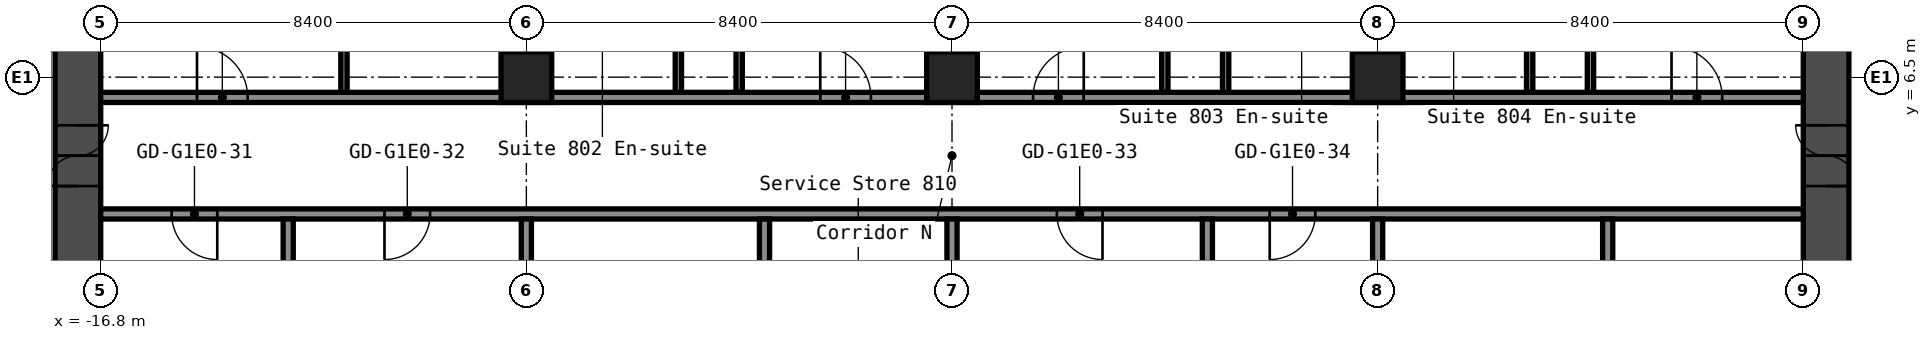
"""IFC4 building model, lengths in metres.
Left out: names, types, materials, properties, quantities, classifications, styles, units other than length and angle.
Written with IfcOpenShell. Run it as: python <this file> out.ifc"""

import sys

from ifc_helpers import new_model, si_unit, direction, frame, frame_2d, origin, origin_2d, place, context, subcontext, project, spatial, rectangle, hollow_rectangle, extrude, element, fill, save


model = new_model("IFC4")
c1 = context("Model", 3, precision=1e-05, world=origin(), true_north=direction((0.0, 1.0)))
c2 = subcontext(c1, "Body", "Model", "MODEL_VIEW")
j1 = project(units=[si_unit("LENGTHUNIT", "METRE"), si_unit("PLANEANGLEUNIT", "RADIAN")], contexts=[c1])
p1 = place(None, origin())
s1 = spatial("IfcSite", under=j1, at=p1, CompositionType="ELEMENT")
p2 = place(p1, origin())
s2 = spatial("IfcBuilding", under=s1, at=p2, CompositionType="ELEMENT")
p3 = place(p2, frame((0.0, 0.0, 32.6)))
s3 = spatial("IfcBuildingStorey", under=s2, at=p3, CompositionType="ELEMENT", Elevation=32.6)
for number, where, z_axis, x_axis in (
    (1, (-8.4, 6.5, 0.0), (0.0, 0.0, 1.0), (1.0, 0.0, 0.0)),
    (2, (0.0, 6.5, 0.0), (0.0, 0.0, 1.0), (1.0, 0.0, 0.0)),
    (3, (8.4, 6.5, 0.0), (0.0, 0.0, 1.0), (1.0, 0.0, 0.0)),
):
    element("IfcColumn", number, at=place(p3, frame(where, z_axis=z_axis, x_axis=x_axis)), inside=s3, PredefinedType="COLUMN", context=c2, shape_type="SweptSolid", body=[
        extrude(hollow_rectangle(XDim=1.0, YDim=1.0, WallThickness=0.04, at=origin_2d()), origin(), (0.0, 0.0, 1.0), 2.8),
    ])
p4 = place(p3, frame((-17.25, -8.4, 0.0), z_axis=(0.0, 0.0, 1.0), x_axis=(0.0, 1.0, 0.0)))
e4 = element("IfcWall", 4, at=p4, inside=s3, PredefinedType="SHEAR", context=c2, shape_type="SweptSolid", body=[
    extrude(rectangle(XDim=16.8, YDim=0.9, at=frame_2d((8.4, 0.0))), origin(), (0.0, 0.0, 1.0), 2.8),
])
p5 = place(p4, frame((12.75, 0.0, 0.0)))
e5 = element("IfcOpeningElement", 5, at=p5, cuts=e4, PredefinedType="OPENING", context=c2, shape_type="SweptSolid", body=[
    extrude(rectangle(XDim=1.2, YDim=2.1, at=frame_2d((0.6, 1.05))), frame((0.0, 0.46, 0.0), z_axis=(0.0, -1.0, 0.0), x_axis=(1.0, 0.0, 0.0)), (0.0, 0.0, 1.0), 0.92),
])
p6 = place(p4, frame((2.85, 0.0, 0.0)))
e6 = element("IfcOpeningElement", 6, at=p6, cuts=e4, PredefinedType="OPENING", context=c2, shape_type="SweptSolid", body=[
    extrude(rectangle(XDim=1.2, YDim=2.1, at=frame_2d((0.6, 1.05))), frame((0.0, 0.46, 0.0), z_axis=(0.0, -1.0, 0.0), x_axis=(1.0, 0.0, 0.0)), (0.0, 0.0, 1.0), 0.92),
])
p7 = place(p3, frame((17.25, -8.4, 0.0), z_axis=(0.0, 0.0, 1.0), x_axis=(0.0, 1.0, 0.0)))
e7 = element("IfcWall", 7, at=p7, inside=s3, PredefinedType="SHEAR", context=c2, shape_type="SweptSolid", body=[
    extrude(rectangle(XDim=16.8, YDim=0.9, at=frame_2d((8.4, 0.0))), origin(), (0.0, 0.0, 1.0), 2.8),
])
p8 = place(p7, frame((12.75, 0.0, 0.0)))
e8 = element("IfcOpeningElement", 8, at=p8, cuts=e7, PredefinedType="OPENING", context=c2, shape_type="SweptSolid", body=[
    extrude(rectangle(XDim=1.2, YDim=2.1, at=frame_2d((0.6, 1.05))), frame((0.0, 0.46, 0.0), z_axis=(0.0, -1.0, 0.0), x_axis=(1.0, 0.0, 0.0)), (0.0, 0.0, 1.0), 0.92),
])
p9 = place(p7, frame((2.85, 0.0, 0.0)))
e9 = element("IfcOpeningElement", 9, at=p9, cuts=e7, PredefinedType="OPENING", context=c2, shape_type="SweptSolid", body=[
    extrude(rectangle(XDim=1.2, YDim=2.1, at=frame_2d((0.6, 1.05))), frame((0.0, 0.46, 0.0), z_axis=(0.0, -1.0, 0.0), x_axis=(1.0, 0.0, 0.0)), (0.0, 0.0, 1.0), 0.92),
])
p10 = place(p3, frame((-16.8, 3.8, 0.0), z_axis=(0.0, 0.0, 1.0), x_axis=(1.0, 0.0, 0.0)))
e10 = element("IfcWall", 10, at=p10, inside=s3, PredefinedType="PARTITIONING", context=c2, shape_type="SweptSolid", body=[
    extrude(rectangle(XDim=33.6, YDim=0.2, at=frame_2d((16.8, 0.0))), origin(), (0.0, 0.0, 1.0), 2.8),
])
p11 = place(p10, frame((1.4, 0.0, 0.0)))
e11 = element("IfcOpeningElement", 11, at=p11, cuts=e10, PredefinedType="OPENING", context=c2, shape_type="SweptSolid", body=[
    extrude(rectangle(XDim=0.9, YDim=2.1, at=frame_2d((0.45, 1.05))), frame((0.0, 0.11, 0.0), z_axis=(0.0, -1.0, 0.0), x_axis=(1.0, 0.0, 0.0)), (0.0, 0.0, 1.0), 0.22),
])
p12 = place(p10, frame((5.6, 0.0, 0.0)))
e12 = element("IfcOpeningElement", 12, at=p12, cuts=e10, PredefinedType="OPENING", context=c2, shape_type="SweptSolid", body=[
    extrude(rectangle(XDim=0.9, YDim=2.1, at=frame_2d((0.45, 1.05))), frame((0.0, 0.11, 0.0), z_axis=(0.0, -1.0, 0.0), x_axis=(1.0, 0.0, 0.0)), (0.0, 0.0, 1.0), 0.22),
])
p13 = place(p10, frame((18.87, 0.0, 0.0)))
e13 = element("IfcOpeningElement", 13, at=p13, cuts=e10, PredefinedType="OPENING", context=c2, shape_type="SweptSolid", body=[
    extrude(rectangle(XDim=0.9, YDim=2.1, at=frame_2d((0.45, 1.05))), frame((0.0, 0.11, 0.0), z_axis=(0.0, -1.0, 0.0), x_axis=(1.0, 0.0, 0.0)), (0.0, 0.0, 1.0), 0.22),
])
p14 = place(p10, frame((23.07, 0.0, 0.0)))
e14 = element("IfcOpeningElement", 14, at=p14, cuts=e10, PredefinedType="OPENING", context=c2, shape_type="SweptSolid", body=[
    extrude(rectangle(XDim=0.9, YDim=2.1, at=frame_2d((0.45, 1.05))), frame((0.0, 0.11, 0.0), z_axis=(0.0, -1.0, 0.0), x_axis=(1.0, 0.0, 0.0)), (0.0, 0.0, 1.0), 0.22),
])
p15 = place(p3, frame((-16.8, 6.1, 0.0), z_axis=(0.0, 0.0, 1.0), x_axis=(1.0, 0.0, 0.0)))
e15 = element("IfcWall", 15, at=p15, inside=s3, PredefinedType="PARTITIONING", context=c2, shape_type="SweptSolid", body=[
    extrude(rectangle(XDim=33.6, YDim=0.2, at=frame_2d((16.8, 0.0))), origin(), (0.0, 0.0, 1.0), 2.8),
])
p16 = place(p15, frame((1.9, 0.0, 0.0)))
e16 = element("IfcOpeningElement", 16, at=p16, cuts=e15, PredefinedType="OPENING", context=c2, shape_type="SweptSolid", body=[
    extrude(rectangle(XDim=1.0, YDim=2.1, at=frame_2d((0.5, 1.05))), frame((0.0, 0.11, 0.0), z_axis=(0.0, -1.0, 0.0), x_axis=(1.0, 0.0, 0.0)), (0.0, 0.0, 1.0), 0.22),
])
p17 = place(p15, frame((14.2, 0.0, 0.0)))
e17 = element("IfcOpeningElement", 17, at=p17, cuts=e15, PredefinedType="OPENING", context=c2, shape_type="SweptSolid", body=[
    extrude(rectangle(XDim=1.0, YDim=2.1, at=frame_2d((0.5, 1.05))), frame((0.0, 0.11, 0.0), z_axis=(0.0, -1.0, 0.0), x_axis=(1.0, 0.0, 0.0)), (0.0, 0.0, 1.0), 0.22),
])
p18 = place(p15, frame((18.4, 0.0, 0.0)))
e18 = element("IfcOpeningElement", 18, at=p18, cuts=e15, PredefinedType="OPENING", context=c2, shape_type="SweptSolid", body=[
    extrude(rectangle(XDim=1.0, YDim=2.1, at=frame_2d((0.5, 1.05))), frame((0.0, 0.11, 0.0), z_axis=(0.0, -1.0, 0.0), x_axis=(1.0, 0.0, 0.0)), (0.0, 0.0, 1.0), 0.22),
])
p19 = place(p15, frame((31.0, 0.0, 0.0)))
e19 = element("IfcOpeningElement", 19, at=p19, cuts=e15, PredefinedType="OPENING", context=c2, shape_type="SweptSolid", body=[
    extrude(rectangle(XDim=1.0, YDim=2.1, at=frame_2d((0.5, 1.05))), frame((0.0, 0.11, 0.0), z_axis=(0.0, -1.0, 0.0), x_axis=(1.0, 0.0, 0.0)), (0.0, 0.0, 1.0), 0.22),
])
p20 = place(p3, frame((-13.1, -3.7, 0.0), z_axis=(0.0, 0.0, 1.0), x_axis=(0.0, 1.0, 0.0)))
e20 = element("IfcWall", 20, at=p20, inside=s3, PredefinedType="PARTITIONING", context=c2, shape_type="SweptSolid", body=[
    extrude(rectangle(XDim=7.4, YDim=0.2, at=frame_2d((3.7, 0.0))), origin(), (0.0, 0.0, 1.0), 2.8),
])
p21 = place(p3, frame((-12.0, 6.2, 0.0), z_axis=(0.0, 0.0, 1.0), x_axis=(0.0, 1.0, 0.0)))
e21 = element("IfcWall", 21, at=p21, inside=s3, PredefinedType="PARTITIONING", context=c2, shape_type="SweptSolid", body=[
    extrude(rectangle(XDim=3.3, YDim=0.125, at=frame_2d((1.65, 0.0))), origin(), (0.0, 0.0, 1.0), 2.8),
])
p22 = place(p21, frame((1.1, 0.0, 0.0)))
e22 = element("IfcOpeningElement", 22, at=p22, cuts=e21, PredefinedType="OPENING", context=c2, shape_type="SweptSolid", body=[
    extrude(rectangle(XDim=1.0, YDim=2.1, at=frame_2d((0.5, 1.05))), frame((0.0, 0.073, 0.0), z_axis=(0.0, -1.0, 0.0), x_axis=(1.0, 0.0, 0.0)), (0.0, 0.0, 1.0), 0.145),
])
p23 = place(p3, frame((-8.4, -3.7, 0.0), z_axis=(0.0, 0.0, 1.0), x_axis=(0.0, 1.0, 0.0)))
e23 = element("IfcWall", 23, at=p23, inside=s3, PredefinedType="PARTITIONING", context=c2, shape_type="SweptSolid", body=[
    extrude(rectangle(XDim=7.4, YDim=0.2, at=frame_2d((3.7, 0.0))), origin(), (0.0, 0.0, 1.0), 2.8),
])
p24 = place(p3, frame((-8.4, 6.99, 0.0), z_axis=(0.0, 0.0, 1.0), x_axis=(0.0, 1.0, 0.0)))
e24 = element("IfcWall", 24, at=p24, inside=s3, PredefinedType="PARTITIONING", context=c2, shape_type="SweptSolid", body=[
    extrude(rectangle(XDim=13.31, YDim=0.2, at=frame_2d((6.655, 0.0))), origin(), (0.0, 0.0, 1.0), 2.8),
])
p25 = place(p3, frame((-5.4, 6.2, 0.0), z_axis=(0.0, 0.0, 1.0), x_axis=(0.0, 1.0, 0.0)))
e25 = element("IfcWall", 25, at=p25, inside=s3, PredefinedType="PARTITIONING", context=c2, shape_type="SweptSolid", body=[
    extrude(rectangle(XDim=3.1, YDim=0.125, at=frame_2d((1.55, 0.0))), origin(), (0.0, 0.0, 1.0), 2.8),
])
p26 = place(p3, frame((-4.2, 6.2, 0.0), z_axis=(0.0, 0.0, 1.0), x_axis=(0.0, 1.0, 0.0)))
e26 = element("IfcWall", 26, at=p26, inside=s3, PredefinedType="PARTITIONING", context=c2, shape_type="SweptSolid", body=[
    extrude(rectangle(XDim=14.1, YDim=0.125, at=frame_2d((7.05, 0.0))), origin(), (0.0, 0.0, 1.0), 2.8),
])
p27 = place(p26, frame((4.05, 0.0, 0.0)))
e27 = element("IfcOpeningElement", 27, at=p27, cuts=e26, PredefinedType="OPENING", context=c2, shape_type="SweptSolid", body=[
    extrude(rectangle(XDim=0.9, YDim=2.1, at=frame_2d((0.45, 1.05))), frame((0.0, 0.073, 0.0), z_axis=(0.0, -1.0, 0.0), x_axis=(1.0, 0.0, 0.0)), (0.0, 0.0, 1.0), 0.145),
])
for number, where, z_axis, x_axis in (
    (28, (-3.7, -3.7, 0.0), (0.0, 0.0, 1.0), (0.0, 1.0, 0.0)),
    (29, (0.0, -3.7, 0.0), (0.0, 0.0, 1.0), (0.0, 1.0, 0.0)),
):
    element("IfcWall", number, at=place(p3, frame(where, z_axis=z_axis, x_axis=x_axis)), inside=s3, PredefinedType="PARTITIONING", context=c2, shape_type="SweptSolid", body=[
        extrude(rectangle(XDim=7.4, YDim=0.2, at=frame_2d((3.7, 0.0))), origin(), (0.0, 0.0, 1.0), 2.8),
    ])
p28 = place(p3, frame((0.0, 6.99, 0.0), z_axis=(0.0, 0.0, 1.0), x_axis=(0.0, 1.0, 0.0)))
e30 = element("IfcWall", 30, at=p28, inside=s3, PredefinedType="PARTITIONING", context=c2, shape_type="SweptSolid", body=[
    extrude(rectangle(XDim=13.31, YDim=0.2, at=frame_2d((6.655, 0.0))), origin(), (0.0, 0.0, 1.0), 2.8),
])
p29 = place(p3, frame((4.2, 6.2, 0.0), z_axis=(0.0, 0.0, 1.0), x_axis=(0.0, 1.0, 0.0)))
e31 = element("IfcWall", 31, at=p29, inside=s3, PredefinedType="PARTITIONING", context=c2, shape_type="SweptSolid", body=[
    extrude(rectangle(XDim=14.1, YDim=0.125, at=frame_2d((7.05, 0.0))), origin(), (0.0, 0.0, 1.0), 2.8),
])
p30 = place(p29, frame((4.05, 0.0, 0.0)))
e32 = element("IfcOpeningElement", 32, at=p30, cuts=e31, PredefinedType="OPENING", context=c2, shape_type="SweptSolid", body=[
    extrude(rectangle(XDim=0.9, YDim=2.1, at=frame_2d((0.45, 1.05))), frame((0.0, 0.073, 0.0), z_axis=(0.0, -1.0, 0.0), x_axis=(1.0, 0.0, 0.0)), (0.0, 0.0, 1.0), 0.145),
])
p31 = place(p3, frame((5.04, -3.7, 0.0), z_axis=(0.0, 0.0, 1.0), x_axis=(0.0, 1.0, 0.0)))
e33 = element("IfcWall", 33, at=p31, inside=s3, PredefinedType="PARTITIONING", context=c2, shape_type="SweptSolid", body=[
    extrude(rectangle(XDim=7.4, YDim=0.2, at=frame_2d((3.7, 0.0))), origin(), (0.0, 0.0, 1.0), 2.8),
])
p32 = place(p3, frame((5.4, 6.2, 0.0), z_axis=(0.0, 0.0, 1.0), x_axis=(0.0, 1.0, 0.0)))
e34 = element("IfcWall", 34, at=p32, inside=s3, PredefinedType="PARTITIONING", context=c2, shape_type="SweptSolid", body=[
    extrude(rectangle(XDim=3.1, YDim=0.125, at=frame_2d((1.55, 0.0))), origin(), (0.0, 0.0, 1.0), 2.8),
])
p33 = place(p3, frame((8.4, -3.7, 0.0), z_axis=(0.0, 0.0, 1.0), x_axis=(0.0, 1.0, 0.0)))
e35 = element("IfcWall", 35, at=p33, inside=s3, PredefinedType="PARTITIONING", context=c2, shape_type="SweptSolid", body=[
    extrude(rectangle(XDim=7.4, YDim=0.2, at=frame_2d((3.7, 0.0))), origin(), (0.0, 0.0, 1.0), 2.8),
])
p34 = place(p3, frame((8.4, 6.99, 0.0), z_axis=(0.0, 0.0, 1.0), x_axis=(0.0, 1.0, 0.0)))
e36 = element("IfcWall", 36, at=p34, inside=s3, PredefinedType="PARTITIONING", context=c2, shape_type="SweptSolid", body=[
    extrude(rectangle(XDim=13.31, YDim=0.2, at=frame_2d((6.655, 0.0))), origin(), (0.0, 0.0, 1.0), 2.8),
])
p35 = place(p3, frame((11.4, 6.2, 0.0), z_axis=(0.0, 0.0, 1.0), x_axis=(0.0, 1.0, 0.0)))
e37 = element("IfcWall", 37, at=p35, inside=s3, PredefinedType="PARTITIONING", context=c2, shape_type="SweptSolid", body=[
    extrude(rectangle(XDim=3.1, YDim=0.125, at=frame_2d((1.55, 0.0))), origin(), (0.0, 0.0, 1.0), 2.8),
])
p36 = place(p3, frame((12.6, 6.2, 0.0), z_axis=(0.0, 0.0, 1.0), x_axis=(0.0, 1.0, 0.0)))
e38 = element("IfcWall", 38, at=p36, inside=s3, PredefinedType="PARTITIONING", context=c2, shape_type="SweptSolid", body=[
    extrude(rectangle(XDim=14.1, YDim=0.125, at=frame_2d((7.05, 0.0))), origin(), (0.0, 0.0, 1.0), 2.8),
])
p37 = place(p36, frame((4.05, 0.0, 0.0)))
e39 = element("IfcOpeningElement", 39, at=p37, cuts=e38, PredefinedType="OPENING", context=c2, shape_type="SweptSolid", body=[
    extrude(rectangle(XDim=0.9, YDim=2.1, at=frame_2d((0.45, 1.05))), frame((0.0, 0.073, 0.0), z_axis=(0.0, -1.0, 0.0), x_axis=(1.0, 0.0, 0.0)), (0.0, 0.0, 1.0), 0.145),
])
p38 = place(p3, frame((12.94, -3.7, 0.0), z_axis=(0.0, 0.0, 1.0), x_axis=(0.0, 1.0, 0.0)))
e40 = element("IfcWall", 40, at=p38, inside=s3, PredefinedType="PARTITIONING", context=c2, shape_type="SweptSolid", body=[
    extrude(rectangle(XDim=7.4, YDim=0.2, at=frame_2d((3.7, 0.0))), origin(), (0.0, 0.0, 1.0), 2.8),
])
p39 = place(p5, origin())
e41 = element("IfcDoor", 41, at=p39, inside=s3, OperationType="DOUBLE_DOOR_SINGLE_SWING", PredefinedType="DOOR", context=c2, shape_type="SweptSolid", body=[
    extrude(rectangle(XDim=1.2, YDim=2.1, at=frame_2d((0.6, 1.05))), frame((0.0, 0.025, 0.0), z_axis=(0.0, -1.0, 0.0), x_axis=(1.0, 0.0, 0.0)), (0.0, 0.0, 1.0), 0.05),
])
fill(e5, e41)
p40 = place(p8, origin())
e42 = element("IfcDoor", 42, at=p40, inside=s3, OperationType="DOUBLE_DOOR_SINGLE_SWING", PredefinedType="DOOR", context=c2, shape_type="SweptSolid", body=[
    extrude(rectangle(XDim=1.2, YDim=2.1, at=frame_2d((0.6, 1.05))), frame((0.0, 0.025, 0.0), z_axis=(0.0, -1.0, 0.0), x_axis=(1.0, 0.0, 0.0)), (0.0, 0.0, 1.0), 0.05),
])
fill(e8, e42)
p41 = place(p11, origin())
e43 = element("IfcDoor", 43, at=p41, inside=s3, OperationType="SINGLE_SWING_RIGHT", PredefinedType="DOOR", context=c2, shape_type="SweptSolid", body=[
    extrude(rectangle(XDim=0.9, YDim=2.1, at=frame_2d((0.45, 1.05))), frame((0.0, 0.025, 0.0), z_axis=(0.0, -1.0, 0.0), x_axis=(1.0, 0.0, 0.0)), (0.0, 0.0, 1.0), 0.05),
])
fill(e11, e43)
p42 = place(p12, origin())
e44 = element("IfcDoor", 44, at=p42, inside=s3, OperationType="SINGLE_SWING_LEFT", PredefinedType="DOOR", context=c2, shape_type="SweptSolid", body=[
    extrude(rectangle(XDim=0.9, YDim=2.1, at=frame_2d((0.45, 1.05))), frame((0.0, 0.025, 0.0), z_axis=(0.0, -1.0, 0.0), x_axis=(1.0, 0.0, 0.0)), (0.0, 0.0, 1.0), 0.05),
])
fill(e12, e44)
p43 = place(p13, origin())
e45 = element("IfcDoor", 45, at=p43, inside=s3, OperationType="SINGLE_SWING_RIGHT", PredefinedType="DOOR", context=c2, shape_type="SweptSolid", body=[
    extrude(rectangle(XDim=0.9, YDim=2.1, at=frame_2d((0.45, 1.05))), frame((0.0, 0.025, 0.0), z_axis=(0.0, -1.0, 0.0), x_axis=(1.0, 0.0, 0.0)), (0.0, 0.0, 1.0), 0.05),
])
fill(e13, e45)
p44 = place(p14, origin())
e46 = element("IfcDoor", 46, at=p44, inside=s3, OperationType="SINGLE_SWING_LEFT", PredefinedType="DOOR", context=c2, shape_type="SweptSolid", body=[
    extrude(rectangle(XDim=0.9, YDim=2.1, at=frame_2d((0.45, 1.05))), frame((0.0, 0.025, 0.0), z_axis=(0.0, -1.0, 0.0), x_axis=(1.0, 0.0, 0.0)), (0.0, 0.0, 1.0), 0.05),
])
fill(e14, e46)
p45 = place(p16, origin())
e47 = element("IfcDoor", 47, at=p45, inside=s3, OperationType="SINGLE_SWING_RIGHT", PredefinedType="DOOR", context=c2, shape_type="SweptSolid", body=[
    extrude(rectangle(XDim=1.0, YDim=2.1, at=frame_2d((0.5, 1.05))), frame((0.0, 0.025, 0.0), z_axis=(0.0, -1.0, 0.0), x_axis=(1.0, 0.0, 0.0)), (0.0, 0.0, 1.0), 0.05),
])
fill(e16, e47)
p46 = place(p17, origin())
e48 = element("IfcDoor", 48, at=p46, inside=s3, OperationType="SINGLE_SWING_RIGHT", PredefinedType="DOOR", context=c2, shape_type="SweptSolid", body=[
    extrude(rectangle(XDim=1.0, YDim=2.1, at=frame_2d((0.5, 1.05))), frame((0.0, 0.025, 0.0), z_axis=(0.0, -1.0, 0.0), x_axis=(1.0, 0.0, 0.0)), (0.0, 0.0, 1.0), 0.05),
])
fill(e17, e48)
p47 = place(p18, origin())
e49 = element("IfcDoor", 49, at=p47, inside=s3, OperationType="SINGLE_SWING_LEFT", PredefinedType="DOOR", context=c2, shape_type="SweptSolid", body=[
    extrude(rectangle(XDim=1.0, YDim=2.1, at=frame_2d((0.5, 1.05))), frame((0.0, 0.025, 0.0), z_axis=(0.0, -1.0, 0.0), x_axis=(1.0, 0.0, 0.0)), (0.0, 0.0, 1.0), 0.05),
])
fill(e18, e49)
p48 = place(p19, origin())
e50 = element("IfcDoor", 50, at=p48, inside=s3, OperationType="SINGLE_SWING_RIGHT", PredefinedType="DOOR", context=c2, shape_type="SweptSolid", body=[
    extrude(rectangle(XDim=1.0, YDim=2.1, at=frame_2d((0.5, 1.05))), frame((0.0, 0.025, 0.0), z_axis=(0.0, -1.0, 0.0), x_axis=(1.0, 0.0, 0.0)), (0.0, 0.0, 1.0), 0.05),
])
fill(e19, e50)
save(model, sys.argv[1])
